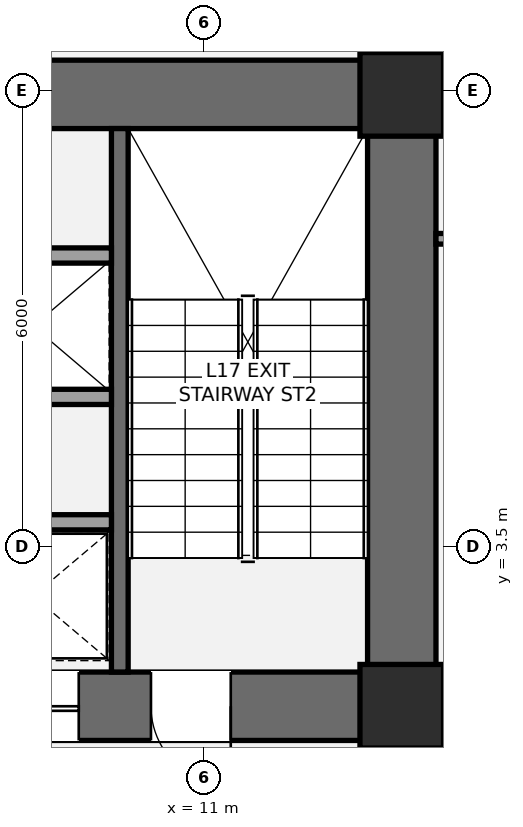
"""IFC4 building model, lengths in metres.
Left out: names, types, materials, properties, quantities, classifications, styles, units other than length and angle.
Written with IfcOpenShell. Run it as: python <this file> out.ifc"""

import sys

from ifc_helpers import new_model, si_unit, direction, frame, frame_2d, origin, origin_2d, place, context, subcontext, project, spatial, rectangle, extrude, element, fill, save


model = new_model("IFC4")
c1 = context("Model", 3, precision=1e-05, world=origin(), true_north=direction((0.0, 1.0)))
c2 = subcontext(c1, "Body", "Model", "MODEL_VIEW")
j1 = project(units=[si_unit("LENGTHUNIT", "METRE"), si_unit("PLANEANGLEUNIT", "RADIAN")], contexts=[c1])
p1 = place(None, origin())
s1 = spatial("IfcSite", under=j1, at=p1, CompositionType="ELEMENT")
p2 = place(p1, origin())
s2 = spatial("IfcBuilding", under=s1, at=p2, CompositionType="ELEMENT")
p3 = place(p2, frame((0.0, 0.0, 66.6)))
s3 = spatial("IfcBuildingStorey", under=s2, at=p3, CompositionType="ELEMENT", Elevation=66.6)
p4 = place(p3, frame((13.6, 0.95, 0.0), z_axis=(0.0, 0.0, 1.0), x_axis=(0.0, 1.0, 0.0)))
e1 = element("IfcWall", 1, at=p4, inside=s3, PredefinedType="SHEAR", context=c2, shape_type="SweptSolid", body=[
    extrude(rectangle(XDim=8.95, YDim=0.9, at=frame_2d((4.475, 0.0))), origin(), (0.0, 0.0, 1.0), 3.6),
])
p5 = place(p3, frame((4.35, 9.45, 0.0), z_axis=(0.0, 0.0, 1.0), x_axis=(1.0, 0.0, 0.0)))
e2 = element("IfcWall", 2, at=p5, inside=s3, PredefinedType="SHEAR", context=c2, shape_type="SweptSolid", body=[
    extrude(rectangle(XDim=9.7, YDim=0.9, at=frame_2d((4.85, 0.0))), origin(), (0.0, 0.0, 1.0), 3.6),
])
p6 = place(p3, frame((14.05, 1.4, 0.0), z_axis=(0.0, 0.0, 1.0), x_axis=(-1.0, 0.0, 0.0)))
e3 = element("IfcWall", 3, at=p6, inside=s3, PredefinedType="SHEAR", context=c2, shape_type="SweptSolid", body=[
    extrude(rectangle(XDim=9.3, YDim=0.9, at=frame_2d((4.65, 0.0))), origin(), (0.0, 0.0, 1.0), 3.6),
])
p7 = place(p6, frame((2.7, 0.0, 0.0)))
e4 = element("IfcOpeningElement", 4, at=p7, cuts=e3, PredefinedType="OPENING", context=c2, shape_type="SweptSolid", body=[
    extrude(rectangle(XDim=1.05, YDim=2.15, at=frame_2d((0.525, 1.075))), frame((0.0, 0.46, 0.0), z_axis=(0.0, -1.0, 0.0), x_axis=(1.0, 0.0, 0.0)), (0.0, 0.0, 1.0), 0.92),
])
p8 = place(p6, frame((4.7, 0.0, 0.0)))
e5 = element("IfcOpeningElement", 5, at=p8, cuts=e3, PredefinedType="OPENING", context=c2, shape_type="SweptSolid", body=[
    extrude(rectangle(XDim=1.1, YDim=2.2, at=frame_2d((0.55, 1.1))), frame((0.0, 0.46, 0.0), z_axis=(0.0, -1.0, 0.0), x_axis=(1.0, 0.0, 0.0)), (0.0, 0.0, 1.0), 0.92),
])
p9 = place(p3, frame((9.89, 1.85, 0.0), z_axis=(0.0, 0.0, 1.0), x_axis=(0.0, 1.0, 0.0)))
e6 = element("IfcWall", 6, at=p9, inside=s3, PredefinedType="SHEAR", context=c2, shape_type="SweptSolid", body=[
    extrude(rectangle(XDim=7.15, YDim=0.22, at=frame_2d((3.575, 0.0))), origin(), (0.0, 0.0, 1.0), 3.6),
])
for number, where, z_axis, x_axis in (
    (7, (13.6, 1.4, 0.0), (0.0, 0.0, 1.0), (1.0, 0.0, 0.0)),
    (8, (13.6, 9.45, 0.0), (0.0, 0.0, 1.0), (1.0, 0.0, 0.0)),
):
    element("IfcColumn", number, at=place(p3, frame(where, z_axis=z_axis, x_axis=x_axis)), inside=s3, PredefinedType="COLUMN", context=c2, shape_type="SweptSolid", body=[
        extrude(rectangle(XDim=1.1, YDim=1.1, at=origin_2d()), origin(), (0.0, 0.0, 1.0), 3.6),
    ])
p10 = place(p3, frame((13.45, -2.15, 0.0), z_axis=(0.0, 0.0, 1.0), x_axis=(0.0, 1.0, 0.0)))
e9 = element("IfcWall", 9, at=p10, inside=s3, PredefinedType="PARTITIONING", context=c2, shape_type="SweptSolid", body=[
    extrude(rectangle(XDim=3.15, YDim=0.165, at=frame_2d((1.575, 0.0))), origin(), (0.0, 0.0, 1.0), 2.853),
])
p11 = place(p10, frame((1.15, 0.0, 0.0)))
e10 = element("IfcOpeningElement", 10, at=p11, cuts=e9, PredefinedType="OPENING", context=c2, shape_type="SweptSolid", body=[
    extrude(rectangle(XDim=1.05, YDim=2.15, at=frame_2d((0.525, 1.075))), frame((0.0, 0.093, 0.0), z_axis=(0.0, -1.0, 0.0), x_axis=(1.0, 0.0, 0.0)), (0.0, 0.0, 1.0), 0.185),
])
p12 = place(p3, frame((5.65, 3.82, 0.0), z_axis=(0.0, 0.0, 1.0), x_axis=(1.0, 0.0, 0.0)))
e11 = element("IfcWall", 11, at=p12, inside=s3, PredefinedType="SOLIDWALL", context=c2, shape_type="SweptSolid", body=[
    extrude(rectangle(XDim=4.13, YDim=0.2, at=frame_2d((2.065, 0.0))), origin(), (0.0, 0.0, 1.0), 3.4),
])
p13 = place(p12, frame((0.65, 0.0, 0.0)))
e12 = element("IfcOpeningElement", 12, at=p13, cuts=e11, PredefinedType="OPENING", context=c2, shape_type="SweptSolid", body=[
    extrude(rectangle(XDim=1.2, YDim=2.2, at=frame_2d((0.6, 1.1))), frame((0.0, 0.11, 0.0), z_axis=(0.0, -1.0, 0.0), x_axis=(1.0, 0.0, 0.0)), (0.0, 0.0, 1.0), 0.22),
])
for number, where, z_axis, x_axis in (
    (13, (5.65, 5.47, 0.0), (0.0, 0.0, 1.0), (1.0, 0.0, 0.0)),
    (14, (5.65, 7.33, 0.0), (0.0, 0.0, 1.0), (1.0, 0.0, 0.0)),
):
    element("IfcWall", number, at=place(p3, frame(where, z_axis=z_axis, x_axis=x_axis)), inside=s3, PredefinedType="SOLIDWALL", context=c2, shape_type="SweptSolid", body=[
        extrude(rectangle(XDim=4.13, YDim=0.2, at=frame_2d((2.065, 0.0))), origin(), (0.0, 0.0, 1.0), 3.4),
    ])
p14 = place(p3, frame((14.05, 7.55, 0.0), z_axis=(0.0, 0.0, 1.0), x_axis=(1.0, 0.0, 0.0)))
e15 = element("IfcWall", 15, at=p14, inside=s3, PredefinedType="PARTITIONING", context=c2, shape_type="SweptSolid", body=[
    extrude(rectangle(XDim=12.118, YDim=0.14, at=frame_2d((6.059, 0.0))), origin(), (0.0, 0.0, 1.0), 2.853),
])
p15 = place(p14, frame((1.2, 0.0, 0.0)))
e16 = element("IfcOpeningElement", 16, at=p15, cuts=e15, PredefinedType="OPENING", context=c2, shape_type="SweptSolid", body=[
    extrude(rectangle(XDim=0.92, YDim=2.15, at=frame_2d((0.46, 1.075))), frame((0.0, 0.08, 0.0), z_axis=(0.0, -1.0, 0.0), x_axis=(1.0, 0.0, 0.0)), (0.0, 0.0, 1.0), 0.16),
])
p16 = place(p7, origin())
e17 = element("IfcDoor", 17, at=p16, inside=s3, OperationType="SINGLE_SWING_LEFT", PredefinedType="DOOR", context=c2, shape_type="SweptSolid", body=[
    extrude(rectangle(XDim=1.05, YDim=2.15, at=frame_2d((0.525, 1.075))), frame((0.0, 0.025, 0.0), z_axis=(0.0, -1.0, 0.0), x_axis=(1.0, 0.0, 0.0)), (0.0, 0.0, 1.0), 0.05),
])
fill(e4, e17)
p17 = place(p8, origin())
e18 = element("IfcDoor", 18, at=p17, inside=s3, OperationType="SLIDING_TO_LEFT", PredefinedType="DOOR", context=c2, shape_type="SweptSolid", body=[
    extrude(rectangle(XDim=1.1, YDim=2.2, at=frame_2d((0.55, 1.1))), frame((0.0, 0.025, 0.0), z_axis=(0.0, -1.0, 0.0), x_axis=(1.0, 0.0, 0.0)), (0.0, 0.0, 1.0), 0.05),
])
fill(e5, e18)
save(model, sys.argv[1])
